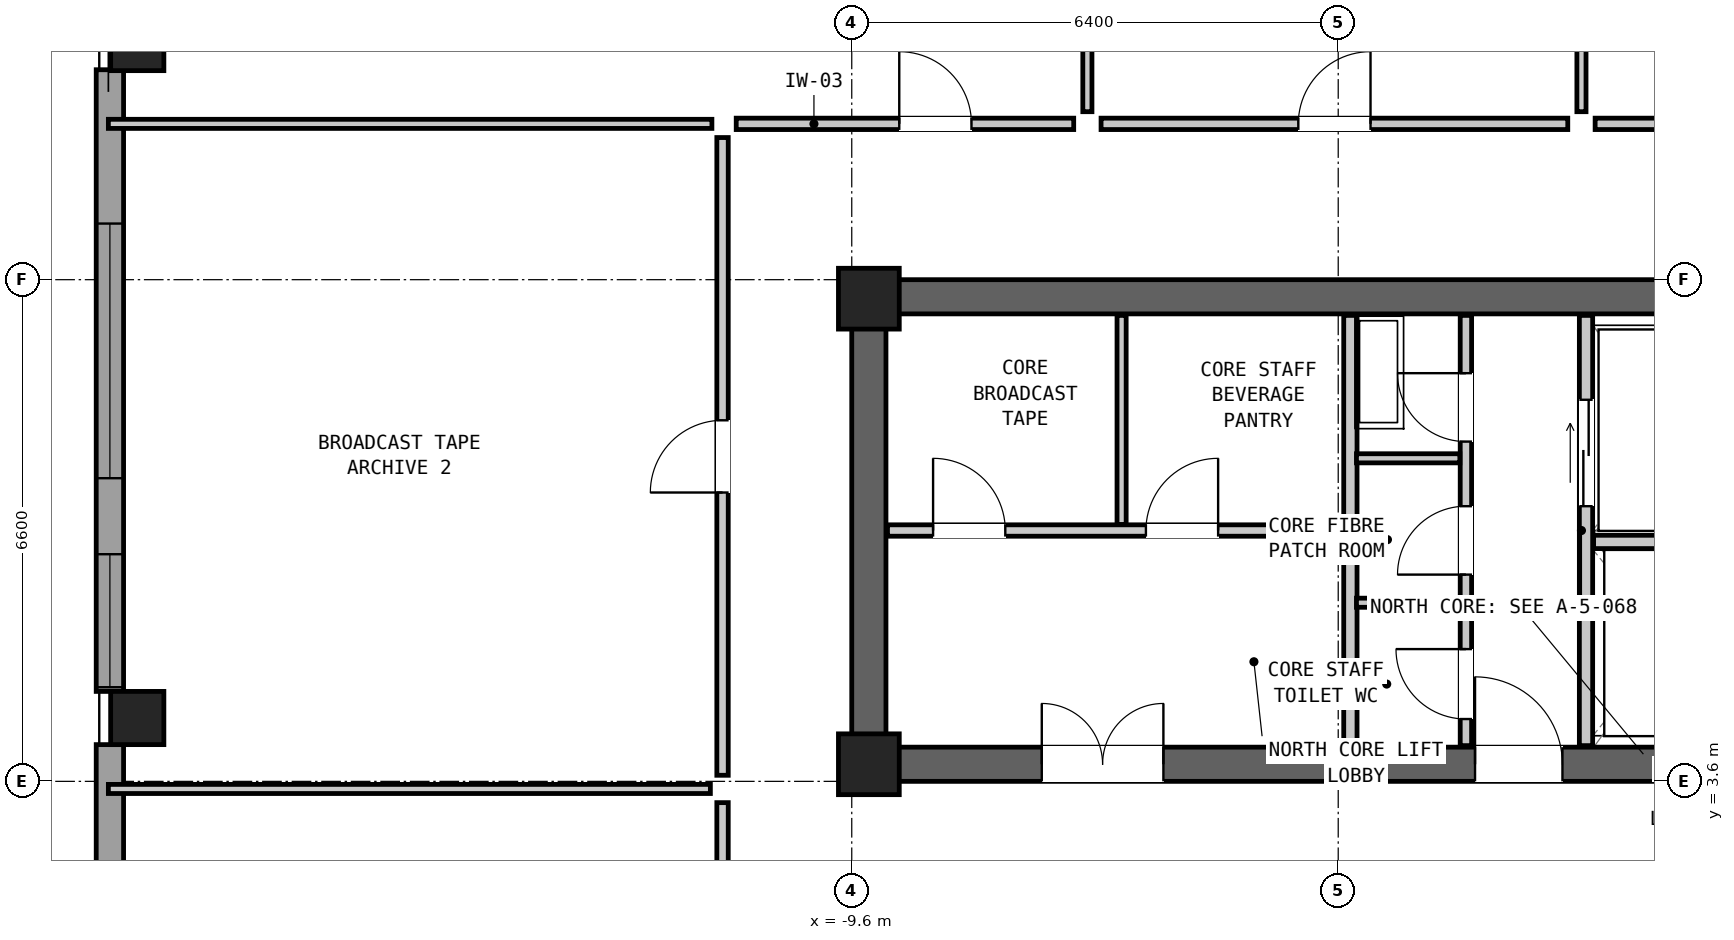
"""IFC4 building model, lengths in metres.
Left out: names, types, materials, properties, quantities, classifications, styles, units other than length and angle.
Written with IfcOpenShell. Run it as: python <this file> out.ifc"""

import sys

from ifc_helpers import new_model, si_unit, direction, frame, frame_2d, origin, origin_2d, place, context, subcontext, project, spatial, rectangle, hollow_rectangle, extrude, element, fill, save


model = new_model("IFC4")
c1 = context("Model", 3, precision=1e-05, world=origin(), true_north=direction((0.0, 1.0)))
c2 = subcontext(c1, "Body", "Model", "MODEL_VIEW")
j1 = project(units=[si_unit("LENGTHUNIT", "METRE"), si_unit("PLANEANGLEUNIT", "RADIAN")], contexts=[c1])
p1 = place(None, origin())
s1 = spatial("IfcSite", under=j1, at=p1, CompositionType="ELEMENT")
p2 = place(p1, origin())
s2 = spatial("IfcBuilding", under=s1, at=p2, CompositionType="ELEMENT")
p3 = place(p2, frame((0.0, 0.0, 220.85)))
s3 = spatial("IfcBuildingStorey", under=s2, at=p3, CompositionType="ELEMENT", Elevation=220.85)
p4 = place(p3, frame((-9.6, 9.975, 0.0), z_axis=(0.0, 0.0, 1.0), x_axis=(1.0, 0.0, 0.0)))
e1 = element("IfcWall", 1, at=p4, inside=s3, PredefinedType="SHEAR", context=c2, shape_type="SweptSolid", body=[
    extrude(rectangle(XDim=19.2, YDim=0.45, at=frame_2d((9.6, 0.0))), origin(), (0.0, 0.0, 1.0), 3.05),
])
p5 = place(p3, frame((-9.6, 3.825, 0.0), z_axis=(0.0, 0.0, 1.0), x_axis=(1.0, 0.0, 0.0)))
e2 = element("IfcWall", 2, at=p5, inside=s3, PredefinedType="SHEAR", context=c2, shape_type="SweptSolid", body=[
    extrude(rectangle(XDim=19.2, YDim=0.45, at=frame_2d((9.6, 0.0))), origin(), (0.0, 0.0, 1.0), 3.05),
])
p6 = place(p5, frame((14.2, 0.0, 0.0)))
e3 = element("IfcOpeningElement", 3, at=p6, cuts=e2, PredefinedType="OPENING", context=c2, shape_type="SweptSolid", body=[
    extrude(rectangle(XDim=1.1, YDim=2.08, at=frame_2d((0.55, 1.04))), frame((0.0, 0.237, 0.0), z_axis=(0.0, -1.0, 0.0), x_axis=(1.0, 0.0, 0.0)), (0.0, 0.0, 1.0), 0.474),
])
p7 = place(p5, frame((8.2, 0.0, 0.0)))
e4 = element("IfcOpeningElement", 4, at=p7, cuts=e2, PredefinedType="OPENING", context=c2, shape_type="SweptSolid", body=[
    extrude(rectangle(XDim=1.15, YDim=2.1, at=frame_2d((0.575, 1.05))), frame((0.0, 0.237, 0.0), z_axis=(0.0, -1.0, 0.0), x_axis=(1.0, 0.0, 0.0)), (0.0, 0.0, 1.0), 0.474),
])
p8 = place(p5, frame((2.5, 0.0, 0.0)))
e5 = element("IfcOpeningElement", 5, at=p8, cuts=e2, PredefinedType="OPENING", context=c2, shape_type="SweptSolid", body=[
    extrude(rectangle(XDim=1.6, YDim=2.12, at=frame_2d((0.8, 1.06))), frame((0.0, 0.237, 0.0), z_axis=(0.0, -1.0, 0.0), x_axis=(1.0, 0.0, 0.0)), (0.0, 0.0, 1.0), 0.474),
])
p9 = place(p3, frame((-9.375, 3.6, 0.0), z_axis=(0.0, 0.0, 1.0), x_axis=(0.0, 1.0, 0.0)))
e6 = element("IfcWall", 6, at=p9, inside=s3, PredefinedType="SHEAR", context=c2, shape_type="SweptSolid", body=[
    extrude(rectangle(XDim=6.6, YDim=0.45, at=frame_2d((3.3, 0.0))), origin(), (0.0, 0.0, 1.0), 3.05),
])
for number, where, z_axis, x_axis in (
    (7, (-19.0, 13.3, 0.0), (0.0, 0.0, 1.0), (0.0, 1.0, 0.0)),
    (8, (-19.0, 4.433, 0.0), (0.0, 0.0, 1.0), (0.0, 1.0, 0.0)),
):
    element("IfcColumn", number, at=place(p3, frame(where, z_axis=z_axis, x_axis=x_axis)), inside=s3, PredefinedType="COLUMN", context=c2, shape_type="SweptSolid", body=[
        extrude(hollow_rectangle(XDim=0.7, YDim=0.7, WallThickness=0.045, at=origin_2d()), origin(), (0.0, 0.0, 1.0), 3.05),
    ])
for number, where, z_axis, x_axis in (
    (9, (-9.375, 9.95, 0.0), (0.0, 0.0, 1.0), (1.0, 0.0, 0.0)),
    (10, (-9.375, 3.825, 0.0), (0.0, 0.0, 1.0), (1.0, 0.0, 0.0)),
):
    element("IfcColumn", number, at=place(p3, frame(where, z_axis=z_axis, x_axis=x_axis)), inside=s3, PredefinedType="COLUMN", context=c2, shape_type="SweptSolid", body=[
        extrude(rectangle(XDim=0.8, YDim=0.8, at=origin_2d()), origin(), (0.0, 0.0, 1.0), 3.05),
    ])
p10 = place(p3, frame((-19.36, -4.083, 0.0), z_axis=(0.0, 0.0, 1.0), x_axis=(0.0, 1.0, 0.0)))
e11 = element("IfcWall", 11, at=p10, inside=s3, PredefinedType="SOLIDWALL", context=c2, shape_type="SweptSolid", body=[
    extrude(rectangle(XDim=8.167, YDim=0.36, at=frame_2d((4.083, 0.0))), origin(), (0.0, 0.0, 1.0), 2.374),
])
p11 = place(p10, frame((2.321, 0.0, 0.2)))
e12 = element("IfcOpeningElement", 12, at=p11, cuts=e11, PredefinedType="OPENING", context=c2, shape_type="SweptSolid", body=[
    extrude(rectangle(XDim=3.5, YDim=0.95, at=frame_2d((1.75, 0.475))), frame((0.0, 0.192, 0.0), z_axis=(0.0, -1.0, 0.0), x_axis=(1.0, 0.0, 0.0)), (0.0, 0.0, 1.0), 0.384),
])
p12 = place(p3, frame((-19.36, 4.783, 0.0), z_axis=(0.0, 0.0, 1.0), x_axis=(0.0, 1.0, 0.0)))
e13 = element("IfcWall", 13, at=p12, inside=s3, PredefinedType="SOLIDWALL", context=c2, shape_type="SweptSolid", body=[
    extrude(rectangle(XDim=8.179, YDim=0.36, at=frame_2d((4.089, 0.0))), origin(), (0.0, 0.0, 1.0), 2.374),
])
p13 = place(p12, frame((0.055, 0.0, 1.1)))
e14 = element("IfcOpeningElement", 14, at=p13, cuts=e13, PredefinedType="OPENING", context=c2, shape_type="SweptSolid", body=[
    extrude(rectangle(XDim=1.75, YDim=1.1, at=frame_2d((0.875, 0.55))), frame((0.0, 0.192, 0.0), z_axis=(0.0, -1.0, 0.0), x_axis=(1.0, 0.0, 0.0)), (0.0, 0.0, 1.0), 0.384),
])
p14 = place(p12, frame((2.805, 0.0, 0.2)))
e15 = element("IfcOpeningElement", 15, at=p14, cuts=e13, PredefinedType="OPENING", context=c2, shape_type="SweptSolid", body=[
    extrude(rectangle(XDim=3.35, YDim=1.0, at=frame_2d((1.675, 0.5))), frame((0.0, 0.192, 0.0), z_axis=(0.0, -1.0, 0.0), x_axis=(1.0, 0.0, 0.0)), (0.0, 0.0, 1.0), 0.384),
])
p15 = place(p3, frame((0.06, 4.07, 0.0), z_axis=(0.0, 0.0, 1.0), x_axis=(0.0, 1.0, 0.0)))
e16 = element("IfcWall", 16, at=p15, inside=s3, PredefinedType="PARTITIONING", context=c2, shape_type="SweptSolid", body=[
    extrude(rectangle(XDim=5.66, YDim=0.175, at=frame_2d((2.83, 0.0))), origin(), (0.0, 0.0, 1.0), 2.86),
])
p16 = place(p15, frame((3.15, 0.0, 0.0)))
e17 = element("IfcOpeningElement", 17, at=p16, cuts=e16, PredefinedType="OPENING", context=c2, shape_type="SweptSolid", body=[
    extrude(rectangle(XDim=1.4, YDim=2.12, at=frame_2d((0.7, 1.06))), frame((0.0, 0.1, 0.0), z_axis=(0.0, -1.0, 0.0), x_axis=(1.0, 0.0, 0.0)), (0.0, 0.0, 1.0), 0.199),
])
p17 = place(p3, frame((0.16, 6.75, 0.0), z_axis=(0.0, 0.0, 1.0), x_axis=(1.0, 0.0, 0.0)))
e18 = element("IfcWall", 18, at=p17, inside=s3, PredefinedType="PARTITIONING", context=c2, shape_type="SweptSolid", body=[
    extrude(rectangle(XDim=1.98, YDim=0.175, at=frame_2d((0.99, 0.0))), origin(), (0.0, 0.0, 1.0), 2.86),
])
p18 = place(p3, frame((-3.04, 4.07, 0.0), z_axis=(0.0, 0.0, 1.0), x_axis=(0.0, 1.0, 0.0)))
e19 = element("IfcWall", 19, at=p18, inside=s3, PredefinedType="PARTITIONING", context=c2, shape_type="SweptSolid", body=[
    extrude(rectangle(XDim=5.66, YDim=0.175, at=frame_2d((2.83, 0.0))), origin(), (0.0, 0.0, 1.0), 2.86),
])
p19 = place(p3, frame((-1.52, 4.07, 0.0), z_axis=(0.0, 0.0, 1.0), x_axis=(0.0, 1.0, 0.0)))
e20 = element("IfcWall", 20, at=p19, inside=s3, PredefinedType="PARTITIONING", context=c2, shape_type="SweptSolid", body=[
    extrude(rectangle(XDim=5.66, YDim=0.15, at=frame_2d((2.83, 0.0))), origin(), (0.0, 0.0, 1.0), 2.86),
])
p20 = place(p19, frame((4.0, 0.0, 0.0)))
e21 = element("IfcOpeningElement", 21, at=p20, cuts=e20, PredefinedType="OPENING", context=c2, shape_type="SweptSolid", body=[
    extrude(rectangle(XDim=0.9, YDim=2.05, at=frame_2d((0.45, 1.025))), frame((0.0, 0.087, 0.0), z_axis=(0.0, -1.0, 0.0), x_axis=(1.0, 0.0, 0.0)), (0.0, 0.0, 1.0), 0.174),
])
p21 = place(p19, frame((2.25, 0.0, 0.0)))
e22 = element("IfcOpeningElement", 22, at=p21, cuts=e20, PredefinedType="OPENING", context=c2, shape_type="SweptSolid", body=[
    extrude(rectangle(XDim=0.9, YDim=2.05, at=frame_2d((0.45, 1.025))), frame((0.0, 0.087, 0.0), z_axis=(0.0, -1.0, 0.0), x_axis=(1.0, 0.0, 0.0)), (0.0, 0.0, 1.0), 0.174),
])
p22 = place(p19, frame((0.35, 0.0, 0.0)))
e23 = element("IfcOpeningElement", 23, at=p22, cuts=e20, PredefinedType="OPENING", context=c2, shape_type="SweptSolid", body=[
    extrude(rectangle(XDim=0.92, YDim=2.1, at=frame_2d((0.46, 1.05))), frame((0.0, 0.087, 0.0), z_axis=(0.0, -1.0, 0.0), x_axis=(1.0, 0.0, 0.0)), (0.0, 0.0, 1.0), 0.174),
])
for number, where, z_axis, x_axis in (
    (24, (-2.96, 5.95, 0.0), (0.0, 0.0, 1.0), (1.0, 0.0, 0.0)),
    (25, (-2.96, 7.85, 0.0), (0.0, 0.0, 1.0), (1.0, 0.0, 0.0)),
):
    element("IfcWall", number, at=place(p3, frame(where, z_axis=z_axis, x_axis=x_axis)), inside=s3, PredefinedType="PARTITIONING", context=c2, shape_type="SweptSolid", body=[
        extrude(rectangle(XDim=1.36, YDim=0.12, at=frame_2d((0.68, 0.0))), origin(), (0.0, 0.0, 1.0), 2.86),
    ])
p23 = place(p3, frame((-9.13, 6.9, 0.0), z_axis=(0.0, 0.0, 1.0), x_axis=(1.0, 0.0, 0.0)))
e26 = element("IfcWall", 26, at=p23, inside=s3, PredefinedType="PARTITIONING", context=c2, shape_type="SweptSolid", body=[
    extrude(rectangle(XDim=6.01, YDim=0.15, at=frame_2d((3.005, 0.0))), origin(), (0.0, 0.0, 1.0), 2.86),
])
p24 = place(p23, frame((0.6, 0.0, 0.0)))
e27 = element("IfcOpeningElement", 27, at=p24, cuts=e26, PredefinedType="OPENING", context=c2, shape_type="SweptSolid", body=[
    extrude(rectangle(XDim=0.95, YDim=2.1, at=frame_2d((0.475, 1.05))), frame((0.0, 0.087, 0.0), z_axis=(0.0, -1.0, 0.0), x_axis=(1.0, 0.0, 0.0)), (0.0, 0.0, 1.0), 0.174),
])
p25 = place(p23, frame((3.4, 0.0, 0.0)))
e28 = element("IfcOpeningElement", 28, at=p25, cuts=e26, PredefinedType="OPENING", context=c2, shape_type="SweptSolid", body=[
    extrude(rectangle(XDim=0.95, YDim=2.1, at=frame_2d((0.475, 1.05))), frame((0.0, 0.087, 0.0), z_axis=(0.0, -1.0, 0.0), x_axis=(1.0, 0.0, 0.0)), (0.0, 0.0, 1.0), 0.174),
])
p26 = place(p3, frame((-6.05, 6.98, 0.0), z_axis=(0.0, 0.0, 1.0), x_axis=(0.0, 1.0, 0.0)))
e29 = element("IfcWall", 29, at=p26, inside=s3, PredefinedType="PARTITIONING", context=c2, shape_type="SweptSolid", body=[
    extrude(rectangle(XDim=2.75, YDim=0.12, at=frame_2d((1.375, 0.0))), origin(), (0.0, 0.0, 1.0), 2.86),
])
p27 = place(p3, frame((-19.38, 12.25, 0.0), z_axis=(0.0, 0.0, 1.0), x_axis=(1.0, 0.0, 0.0)))
e30 = element("IfcWall", 30, at=p27, inside=s3, PredefinedType="PARTITIONING", context=c2, shape_type="SweptSolid", body=[
    extrude(rectangle(XDim=7.94, YDim=0.12, at=frame_2d((3.97, 0.0))), origin(), (0.0, 0.0, 1.0), 2.86),
])
for number, where, z_axis, x_axis in (
    (31, (-6.5, 12.41, 0.0), (0.0, 0.0, 1.0), (0.0, 1.0, 0.0)),
    (32, (0.0, 12.41, 0.0), (0.0, 0.0, 1.0), (0.0, 1.0, 0.0)),
):
    element("IfcWall", number, at=place(p3, frame(where, z_axis=z_axis, x_axis=x_axis)), inside=s3, PredefinedType="PARTITIONING", context=c2, shape_type="SweptSolid", body=[
        extrude(rectangle(XDim=6.97, YDim=0.12, at=frame_2d((3.485, 0.0))), origin(), (0.0, 0.0, 1.0), 2.381),
    ])
p28 = place(p3, frame((-19.38, 3.5, 0.0), z_axis=(0.0, 0.0, 1.0), x_axis=(1.0, 0.0, 0.0)))
e33 = element("IfcWall", 33, at=p28, inside=s3, PredefinedType="PARTITIONING", context=c2, shape_type="SweptSolid", body=[
    extrude(rectangle(XDim=7.92, YDim=0.12, at=frame_2d((3.96, 0.0))), origin(), (0.0, 0.0, 1.0), 1.981),
])
p29 = place(p3, frame((-11.12, 12.25, 0.0), z_axis=(0.0, 0.0, 1.0), x_axis=(1.0, 0.0, 0.0)))
e34 = element("IfcWall", 34, at=p29, inside=s3, PredefinedType="PARTITIONING", context=c2, shape_type="SweptSolid", body=[
    extrude(rectangle(XDim=4.44, YDim=0.15, at=frame_2d((2.22, 0.0))), origin(), (0.0, 0.0, 1.0), 2.86),
])
p30 = place(p29, frame((2.145, 0.0, 0.0)))
e35 = element("IfcOpeningElement", 35, at=p30, cuts=e34, PredefinedType="OPENING", context=c2, shape_type="SweptSolid", body=[
    extrude(rectangle(XDim=0.95, YDim=2.1, at=frame_2d((0.475, 1.05))), frame((0.0, 0.087, 0.0), z_axis=(0.0, -1.0, 0.0), x_axis=(1.0, 0.0, 0.0)), (0.0, 0.0, 1.0), 0.174),
])
p31 = place(p3, frame((-6.32, 12.25, 0.0), z_axis=(0.0, 0.0, 1.0), x_axis=(1.0, 0.0, 0.0)))
e36 = element("IfcWall", 36, at=p31, inside=s3, PredefinedType="PARTITIONING", context=c2, shape_type="SweptSolid", body=[
    extrude(rectangle(XDim=6.14, YDim=0.15, at=frame_2d((3.07, 0.0))), origin(), (0.0, 0.0, 1.0), 2.86),
])
p32 = place(p31, frame((2.595, 0.0, 0.0)))
e37 = element("IfcOpeningElement", 37, at=p32, cuts=e36, PredefinedType="OPENING", context=c2, shape_type="SweptSolid", body=[
    extrude(rectangle(XDim=0.95, YDim=2.1, at=frame_2d((0.475, 1.05))), frame((0.0, 0.087, 0.0), z_axis=(0.0, -1.0, 0.0), x_axis=(1.0, 0.0, 0.0)), (0.0, 0.0, 1.0), 0.174),
])
p33 = place(p3, frame((0.18, 12.25, 0.0), z_axis=(0.0, 0.0, 1.0), x_axis=(1.0, 0.0, 0.0)))
e38 = element("IfcWall", 38, at=p33, inside=s3, PredefinedType="PARTITIONING", context=c2, shape_type="SweptSolid", body=[
    extrude(rectangle(XDim=6.14, YDim=0.15, at=frame_2d((3.07, 0.0))), origin(), (0.0, 0.0, 1.0), 2.86),
])
p34 = place(p33, frame((2.595, 0.0, 0.0)))
e39 = element("IfcOpeningElement", 39, at=p34, cuts=e38, PredefinedType="OPENING", context=c2, shape_type="SweptSolid", body=[
    extrude(rectangle(XDim=0.95, YDim=2.1, at=frame_2d((0.475, 1.05))), frame((0.0, 0.087, 0.0), z_axis=(0.0, -1.0, 0.0), x_axis=(1.0, 0.0, 0.0)), (0.0, 0.0, 1.0), 0.174),
])
p35 = place(p3, frame((-11.3, -2.82, 0.0), z_axis=(0.0, 0.0, 1.0), x_axis=(0.0, 1.0, 0.0)))
e40 = element("IfcWall", 40, at=p35, inside=s3, PredefinedType="PARTITIONING", context=c2, shape_type="SweptSolid", body=[
    extrude(rectangle(XDim=6.14, YDim=0.15, at=frame_2d((3.07, 0.0))), origin(), (0.0, 0.0, 1.0), 2.86),
])
p36 = place(p35, frame((2.595, 0.0, 0.0)))
e41 = element("IfcOpeningElement", 41, at=p36, cuts=e40, PredefinedType="OPENING", context=c2, shape_type="SweptSolid", body=[
    extrude(rectangle(XDim=0.95, YDim=2.1, at=frame_2d((0.475, 1.05))), frame((0.0, 0.087, 0.0), z_axis=(0.0, -1.0, 0.0), x_axis=(1.0, 0.0, 0.0)), (0.0, 0.0, 1.0), 0.174),
])
p37 = place(p3, frame((-11.3, 3.68, 0.0), z_axis=(0.0, 0.0, 1.0), x_axis=(0.0, 1.0, 0.0)))
e42 = element("IfcWall", 42, at=p37, inside=s3, PredefinedType="PARTITIONING", context=c2, shape_type="SweptSolid", body=[
    extrude(rectangle(XDim=8.39, YDim=0.15, at=frame_2d((4.195, 0.0))), origin(), (0.0, 0.0, 1.0), 2.86),
])
p38 = place(p37, frame((3.72, 0.0, 0.0)))
e43 = element("IfcOpeningElement", 43, at=p38, cuts=e42, PredefinedType="OPENING", context=c2, shape_type="SweptSolid", body=[
    extrude(rectangle(XDim=0.95, YDim=2.1, at=frame_2d((0.475, 1.05))), frame((0.0, 0.087, 0.0), z_axis=(0.0, -1.0, 0.0), x_axis=(1.0, 0.0, 0.0)), (0.0, 0.0, 1.0), 0.174),
])
p39 = place(p13, origin())
e44 = element("IfcWindow", 44, at=p39, inside=s3, PartitioningType="SINGLE_PANEL", PredefinedType="WINDOW", context=c2, shape_type="SweptSolid", body=[
    extrude(rectangle(XDim=1.75, YDim=1.1, at=frame_2d((0.875, 0.55))), frame((0.0, 0.03, 0.0), z_axis=(0.0, -1.0, 0.0), x_axis=(1.0, 0.0, 0.0)), (0.0, 0.0, 1.0), 0.06),
])
fill(e14, e44)
p40 = place(p14, origin())
e45 = element("IfcWindow", 45, at=p40, inside=s3, PartitioningType="SINGLE_PANEL", PredefinedType="WINDOW", context=c2, shape_type="SweptSolid", body=[
    extrude(rectangle(XDim=3.35, YDim=1.0, at=frame_2d((1.675, 0.5))), frame((0.0, 0.03, 0.0), z_axis=(0.0, -1.0, 0.0), x_axis=(1.0, 0.0, 0.0)), (0.0, 0.0, 1.0), 0.06),
])
fill(e15, e45)
p41 = place(p16, origin())
e46 = element("IfcDoor", 46, at=p41, inside=s3, OperationType="DOUBLE_DOOR_SLIDING", PredefinedType="DOOR", context=c2, shape_type="SweptSolid", body=[
    extrude(rectangle(XDim=1.4, YDim=2.12, at=frame_2d((0.7, 1.06))), frame((0.0, 0.025, 0.0), z_axis=(0.0, -1.0, 0.0), x_axis=(1.0, 0.0, 0.0)), (0.0, 0.0, 1.0), 0.05),
])
fill(e17, e46)
p42 = place(p7, origin())
e47 = element("IfcDoor", 47, at=p42, inside=s3, OperationType="SINGLE_SWING_LEFT", PredefinedType="DOOR", context=c2, shape_type="SweptSolid", body=[
    extrude(rectangle(XDim=1.15, YDim=2.1, at=frame_2d((0.575, 1.05))), frame((0.0, 0.025, 0.0), z_axis=(0.0, -1.0, 0.0), x_axis=(1.0, 0.0, 0.0)), (0.0, 0.0, 1.0), 0.05),
])
fill(e4, e47)
p43 = place(p20, origin())
e48 = element("IfcDoor", 48, at=p43, inside=s3, OperationType="SINGLE_SWING_RIGHT", PredefinedType="DOOR", context=c2, shape_type="SweptSolid", body=[
    extrude(rectangle(XDim=0.9, YDim=2.05, at=frame_2d((0.45, 1.025))), frame((0.0, 0.025, 0.0), z_axis=(0.0, -1.0, 0.0), x_axis=(1.0, 0.0, 0.0)), (0.0, 0.0, 1.0), 0.05),
])
fill(e21, e48)
p44 = place(p21, origin())
e49 = element("IfcDoor", 49, at=p44, inside=s3, OperationType="SINGLE_SWING_LEFT", PredefinedType="DOOR", context=c2, shape_type="SweptSolid", body=[
    extrude(rectangle(XDim=0.9, YDim=2.05, at=frame_2d((0.45, 1.025))), frame((0.0, 0.025, 0.0), z_axis=(0.0, -1.0, 0.0), x_axis=(1.0, 0.0, 0.0)), (0.0, 0.0, 1.0), 0.05),
])
fill(e22, e49)
p45 = place(p22, origin())
e50 = element("IfcDoor", 50, at=p45, inside=s3, OperationType="SINGLE_SWING_RIGHT", PredefinedType="DOOR", context=c2, shape_type="SweptSolid", body=[
    extrude(rectangle(XDim=0.92, YDim=2.1, at=frame_2d((0.46, 1.05))), frame((0.0, 0.025, 0.0), z_axis=(0.0, -1.0, 0.0), x_axis=(1.0, 0.0, 0.0)), (0.0, 0.0, 1.0), 0.05),
])
fill(e23, e50)
p46 = place(p8, origin())
e51 = element("IfcDoor", 51, at=p46, inside=s3, OperationType="DOUBLE_DOOR_SINGLE_SWING", PredefinedType="DOOR", context=c2, shape_type="SweptSolid", body=[
    extrude(rectangle(XDim=1.6, YDim=2.12, at=frame_2d((0.8, 1.06))), frame((0.0, 0.025, 0.0), z_axis=(0.0, -1.0, 0.0), x_axis=(1.0, 0.0, 0.0)), (0.0, 0.0, 1.0), 0.05),
])
fill(e5, e51)
p47 = place(p24, origin())
e52 = element("IfcDoor", 52, at=p47, inside=s3, OperationType="SINGLE_SWING_LEFT", PredefinedType="DOOR", context=c2, shape_type="SweptSolid", body=[
    extrude(rectangle(XDim=0.95, YDim=2.1, at=frame_2d((0.475, 1.05))), frame((0.0, 0.025, 0.0), z_axis=(0.0, -1.0, 0.0), x_axis=(1.0, 0.0, 0.0)), (0.0, 0.0, 1.0), 0.05),
])
fill(e27, e52)
p48 = place(p25, origin())
e53 = element("IfcDoor", 53, at=p48, inside=s3, OperationType="SINGLE_SWING_RIGHT", PredefinedType="DOOR", context=c2, shape_type="SweptSolid", body=[
    extrude(rectangle(XDim=0.95, YDim=2.1, at=frame_2d((0.475, 1.05))), frame((0.0, 0.025, 0.0), z_axis=(0.0, -1.0, 0.0), x_axis=(1.0, 0.0, 0.0)), (0.0, 0.0, 1.0), 0.05),
])
fill(e28, e53)
p49 = place(p30, origin())
e54 = element("IfcDoor", 54, at=p49, inside=s3, OperationType="SINGLE_SWING_LEFT", PredefinedType="DOOR", context=c2, shape_type="SweptSolid", body=[
    extrude(rectangle(XDim=0.95, YDim=2.1, at=frame_2d((0.475, 1.05))), frame((0.0, 0.025, 0.0), z_axis=(0.0, -1.0, 0.0), x_axis=(1.0, 0.0, 0.0)), (0.0, 0.0, 1.0), 0.05),
])
fill(e35, e54)
p50 = place(p32, origin())
e55 = element("IfcDoor", 55, at=p50, inside=s3, OperationType="SINGLE_SWING_RIGHT", PredefinedType="DOOR", context=c2, shape_type="SweptSolid", body=[
    extrude(rectangle(XDim=0.95, YDim=2.1, at=frame_2d((0.475, 1.05))), frame((0.0, 0.025, 0.0), z_axis=(0.0, -1.0, 0.0), x_axis=(1.0, 0.0, 0.0)), (0.0, 0.0, 1.0), 0.05),
])
fill(e37, e55)
p51 = place(p38, origin())
e56 = element("IfcDoor", 56, at=p51, inside=s3, OperationType="SINGLE_SWING_LEFT", PredefinedType="DOOR", context=c2, shape_type="SweptSolid", body=[
    extrude(rectangle(XDim=0.95, YDim=2.1, at=frame_2d((0.475, 1.05))), frame((0.0, 0.025, 0.0), z_axis=(0.0, -1.0, 0.0), x_axis=(1.0, 0.0, 0.0)), (0.0, 0.0, 1.0), 0.05),
])
fill(e43, e56)
save(model, sys.argv[1])
